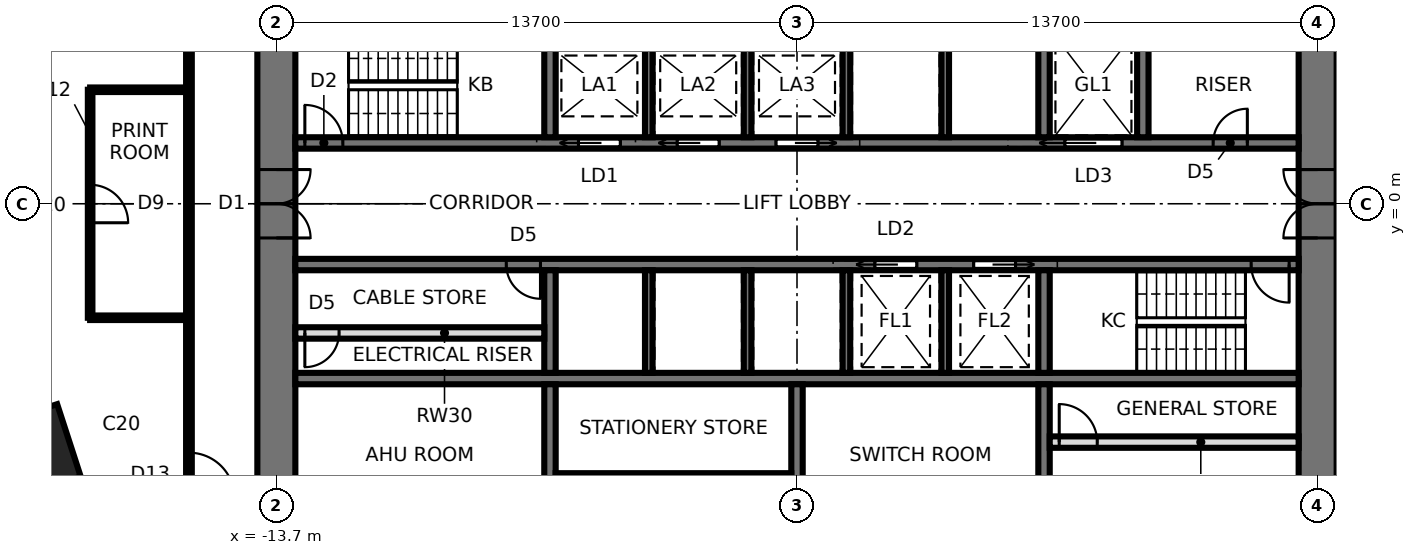
"""IFC4 building model, lengths in metres.
Left out: names, types, materials, properties, quantities, classifications, styles, units other than length and angle.
Written with IfcOpenShell. Run it as: python <this file> out.ifc"""

import sys

from ifc_helpers import new_model, si_unit, direction, frame, frame_2d, origin, origin_2d, place, context, subcontext, project, spatial, rectangle, extrude, element, fill, save


model = new_model("IFC4")
c1 = context("Model", 3, precision=1e-05, world=origin(), true_north=direction((0.0, 1.0)))
c2 = subcontext(c1, "Body", "Model", "MODEL_VIEW")
j1 = project(units=[si_unit("LENGTHUNIT", "METRE"), si_unit("PLANEANGLEUNIT", "RADIAN")], contexts=[c1])
p1 = place(None, origin())
s1 = spatial("IfcSite", under=j1, at=p1, CompositionType="ELEMENT")
p2 = place(p1, origin())
s2 = spatial("IfcBuilding", under=s1, at=p2, CompositionType="ELEMENT")
p3 = place(p2, frame((0.0, 0.0, 82.6)))
s3 = spatial("IfcBuildingStorey", under=s2, at=p3, CompositionType="ELEMENT", Elevation=82.6)
p4 = place(p3, frame((-20.109, -6.534, 0.0), z_axis=(0.0, 0.0, 1.0), x_axis=(-0.951056516295, -0.309016994375, 0.0)))
e1 = element("IfcColumn", 1, at=p4, inside=s3, PredefinedType="COLUMN", context=c2, shape_type="SweptSolid", body=[
    extrude(rectangle(XDim=2.0, YDim=2.0, at=origin_2d()), origin(), (0.0, 0.0, 1.0), 4.2),
])
p5 = place(p3, frame((13.7, -9.5, 0.0), z_axis=(0.0, 0.0, 1.0), x_axis=(0.0, 1.0, 0.0)))
e2 = element("IfcWall", 2, at=p5, inside=s3, PredefinedType="SHEAR", context=c2, shape_type="SweptSolid", body=[
    extrude(rectangle(XDim=19.0, YDim=1.0, at=frame_2d((9.5, 0.0))), origin(), (0.0, 0.0, 1.0), 4.2),
])
p6 = place(p5, frame((8.6, 0.0, 0.0)))
e3 = element("IfcOpeningElement", 3, at=p6, cuts=e2, PredefinedType="OPENING", context=c2, shape_type="SweptSolid", body=[
    extrude(rectangle(XDim=1.8, YDim=2.4, at=frame_2d((0.9, 1.2))), frame((0.0, 0.51, 0.0), z_axis=(0.0, -1.0, 0.0), x_axis=(1.0, 0.0, 0.0)), (0.0, 0.0, 1.0), 1.02),
])
p7 = place(p3, frame((-13.7, 9.5, 0.0), z_axis=(0.0, 0.0, 1.0), x_axis=(0.0, -1.0, 0.0)))
e4 = element("IfcWall", 4, at=p7, inside=s3, PredefinedType="SHEAR", context=c2, shape_type="SweptSolid", body=[
    extrude(rectangle(XDim=19.0, YDim=1.0, at=frame_2d((9.5, 0.0))), origin(), (0.0, 0.0, 1.0), 4.2),
])
p8 = place(p7, frame((8.6, 0.0, 0.0)))
e5 = element("IfcOpeningElement", 5, at=p8, cuts=e4, PredefinedType="OPENING", context=c2, shape_type="SweptSolid", body=[
    extrude(rectangle(XDim=1.8, YDim=2.4, at=frame_2d((0.9, 1.2))), frame((0.0, 0.51, 0.0), z_axis=(0.0, -1.0, 0.0), x_axis=(1.0, 0.0, 0.0)), (0.0, 0.0, 1.0), 1.02),
])
p9 = place(p3, frame((-13.2, 1.6, 0.0), z_axis=(0.0, 0.0, 1.0), x_axis=(1.0, 0.0, 0.0)))
e6 = element("IfcWall", 6, at=p9, inside=s3, PredefinedType="SHEAR", context=c2, shape_type="SweptSolid", body=[
    extrude(rectangle(XDim=26.4, YDim=0.3, at=frame_2d((13.2, 0.0))), origin(), (0.0, 0.0, 1.0), 4.2),
])
p10 = place(p9, frame((0.25, 0.0, 0.0)))
e7 = element("IfcOpeningElement", 7, at=p10, cuts=e6, PredefinedType="OPENING", context=c2, shape_type="SweptSolid", body=[
    extrude(rectangle(XDim=1.0, YDim=2.1, at=frame_2d((0.5, 1.05))), frame((0.0, 0.16, 0.0), z_axis=(0.0, -1.0, 0.0), x_axis=(1.0, 0.0, 0.0)), (0.0, 0.0, 1.0), 0.32),
])
p11 = place(p9, frame((20.25, 0.0, 0.0)))
e8 = element("IfcOpeningElement", 8, at=p11, cuts=e6, PredefinedType="OPENING", context=c2, shape_type="SweptSolid", body=[
    extrude(rectangle(XDim=1.5, YDim=2.4, at=frame_2d((0.75, 1.2))), frame((0.0, 0.16, 0.0), z_axis=(0.0, -1.0, 0.0), x_axis=(1.0, 0.0, 0.0)), (0.0, 0.0, 1.0), 0.32),
])
p12 = place(p9, frame((7.45, 0.0, 0.0)))
e9 = element("IfcOpeningElement", 9, at=p12, cuts=e6, PredefinedType="OPENING", context=c2, shape_type="SweptSolid", body=[
    extrude(rectangle(XDim=1.1, YDim=2.3, at=frame_2d((0.55, 1.15))), frame((0.0, 0.16, 0.0), z_axis=(0.0, -1.0, 0.0), x_axis=(1.0, 0.0, 0.0)), (0.0, 0.0, 1.0), 0.32),
])
p13 = place(p9, frame((10.05, 0.0, 0.0)))
e10 = element("IfcOpeningElement", 10, at=p13, cuts=e6, PredefinedType="OPENING", context=c2, shape_type="SweptSolid", body=[
    extrude(rectangle(XDim=1.1, YDim=2.3, at=frame_2d((0.55, 1.15))), frame((0.0, 0.16, 0.0), z_axis=(0.0, -1.0, 0.0), x_axis=(1.0, 0.0, 0.0)), (0.0, 0.0, 1.0), 0.32),
])
p14 = place(p9, frame((12.65, 0.0, 0.0)))
e11 = element("IfcOpeningElement", 11, at=p14, cuts=e6, PredefinedType="OPENING", context=c2, shape_type="SweptSolid", body=[
    extrude(rectangle(XDim=1.1, YDim=2.3, at=frame_2d((0.55, 1.15))), frame((0.0, 0.16, 0.0), z_axis=(0.0, -1.0, 0.0), x_axis=(1.0, 0.0, 0.0)), (0.0, 0.0, 1.0), 0.32),
])
p15 = place(p9, frame((24.15, 0.0, 0.0)))
e12 = element("IfcOpeningElement", 12, at=p15, cuts=e6, PredefinedType="OPENING", context=c2, shape_type="SweptSolid", body=[
    extrude(rectangle(XDim=0.9, YDim=2.1, at=frame_2d((0.45, 1.05))), frame((0.0, 0.16, 0.0), z_axis=(0.0, -1.0, 0.0), x_axis=(1.0, 0.0, 0.0)), (0.0, 0.0, 1.0), 0.32),
])
p16 = place(p3, frame((-13.2, -1.6, 0.0), z_axis=(0.0, 0.0, 1.0), x_axis=(1.0, 0.0, 0.0)))
e13 = element("IfcWall", 13, at=p16, inside=s3, PredefinedType="SHEAR", context=c2, shape_type="SweptSolid", body=[
    extrude(rectangle(XDim=26.4, YDim=0.3, at=frame_2d((13.2, 0.0))), origin(), (0.0, 0.0, 1.0), 4.2),
])
p17 = place(p16, frame((25.15, 0.0, 0.0)))
e14 = element("IfcOpeningElement", 14, at=p17, cuts=e13, PredefinedType="OPENING", context=c2, shape_type="SweptSolid", body=[
    extrude(rectangle(XDim=1.0, YDim=2.1, at=frame_2d((0.5, 1.05))), frame((0.0, 0.16, 0.0), z_axis=(0.0, -1.0, 0.0), x_axis=(1.0, 0.0, 0.0)), (0.0, 0.0, 1.0), 0.32),
])
p18 = place(p16, frame((15.25, 0.0, 0.0)))
e15 = element("IfcOpeningElement", 15, at=p18, cuts=e13, PredefinedType="OPENING", context=c2, shape_type="SweptSolid", body=[
    extrude(rectangle(XDim=1.1, YDim=2.3, at=frame_2d((0.55, 1.15))), frame((0.0, 0.16, 0.0), z_axis=(0.0, -1.0, 0.0), x_axis=(1.0, 0.0, 0.0)), (0.0, 0.0, 1.0), 0.32),
])
p19 = place(p16, frame((17.85, 0.0, 0.0)))
e16 = element("IfcOpeningElement", 16, at=p19, cuts=e13, PredefinedType="OPENING", context=c2, shape_type="SweptSolid", body=[
    extrude(rectangle(XDim=1.1, YDim=2.3, at=frame_2d((0.55, 1.15))), frame((0.0, 0.16, 0.0), z_axis=(0.0, -1.0, 0.0), x_axis=(1.0, 0.0, 0.0)), (0.0, 0.0, 1.0), 0.32),
])
p20 = place(p16, frame((5.55, 0.0, 0.0)))
e17 = element("IfcOpeningElement", 17, at=p20, cuts=e13, PredefinedType="OPENING", context=c2, shape_type="SweptSolid", body=[
    extrude(rectangle(XDim=0.9, YDim=2.1, at=frame_2d((0.45, 1.05))), frame((0.0, 0.16, 0.0), z_axis=(0.0, -1.0, 0.0), x_axis=(1.0, 0.0, 0.0)), (0.0, 0.0, 1.0), 0.32),
])
p21 = place(p3, frame((-13.2, -4.6, 0.0), z_axis=(0.0, 0.0, 1.0), x_axis=(1.0, 0.0, 0.0)))
e18 = element("IfcWall", 18, at=p21, inside=s3, PredefinedType="SHEAR", context=c2, shape_type="SweptSolid", body=[
    extrude(rectangle(XDim=26.4, YDim=0.3, at=frame_2d((13.2, 0.0))), origin(), (0.0, 0.0, 1.0), 4.2),
])
for number, where, z_axis, x_axis in (
    (19, (-6.5, 1.75, 0.0), (0.0, 0.0, 1.0), (0.0, 1.0, 0.0)),
    (20, (6.5, 1.75, 0.0), (0.0, 0.0, 1.0), (0.0, 1.0, 0.0)),
):
    element("IfcWall", number, at=place(p3, frame(where, z_axis=z_axis, x_axis=x_axis)), inside=s3, PredefinedType="SHEAR", context=c2, shape_type="SweptSolid", body=[
        extrude(rectangle(XDim=2.7, YDim=0.3, at=frame_2d((1.35, 0.0))), origin(), (0.0, 0.0, 1.0), 4.2),
    ])
for number, where, z_axis, x_axis in (
    (21, (-3.9, 1.75, 0.0), (0.0, 0.0, 1.0), (0.0, 1.0, 0.0)),
    (22, (-1.3, 1.75, 0.0), (0.0, 0.0, 1.0), (0.0, 1.0, 0.0)),
    (23, (1.3, 1.75, 0.0), (0.0, 0.0, 1.0), (0.0, 1.0, 0.0)),
    (24, (3.9, 1.75, 0.0), (0.0, 0.0, 1.0), (0.0, 1.0, 0.0)),
):
    element("IfcWall", number, at=place(p3, frame(where, z_axis=z_axis, x_axis=x_axis)), inside=s3, PredefinedType="SHEAR", context=c2, shape_type="SweptSolid", body=[
        extrude(rectangle(XDim=2.7, YDim=0.2, at=frame_2d((1.35, 0.0))), origin(), (0.0, 0.0, 1.0), 4.2),
    ])
p22 = place(p3, frame((-6.5, -1.75, 0.0), z_axis=(0.0, 0.0, 1.0), x_axis=(0.0, -1.0, 0.0)))
e25 = element("IfcWall", 25, at=p22, inside=s3, PredefinedType="SHEAR", context=c2, shape_type="SweptSolid", body=[
    extrude(rectangle(XDim=2.7, YDim=0.3, at=frame_2d((1.35, 0.0))), origin(), (0.0, 0.0, 1.0), 4.2),
])
p23 = place(p3, frame((-6.5, -4.75, 0.0), z_axis=(0.0, 0.0, 1.0), x_axis=(0.0, -1.0, 0.0)))
e26 = element("IfcWall", 26, at=p23, inside=s3, PredefinedType="SHEAR", context=c2, shape_type="SweptSolid", body=[
    extrude(rectangle(XDim=3.75, YDim=0.3, at=frame_2d((1.875, 0.0))), origin(), (0.0, 0.0, 1.0), 4.2),
])
p24 = place(p3, frame((6.5, -1.75, 0.0), z_axis=(0.0, 0.0, 1.0), x_axis=(0.0, -1.0, 0.0)))
e27 = element("IfcWall", 27, at=p24, inside=s3, PredefinedType="SHEAR", context=c2, shape_type="SweptSolid", body=[
    extrude(rectangle(XDim=2.7, YDim=0.3, at=frame_2d((1.35, 0.0))), origin(), (0.0, 0.0, 1.0), 4.2),
])
p25 = place(p3, frame((6.5, -4.75, 0.0), z_axis=(0.0, 0.0, 1.0), x_axis=(0.0, -1.0, 0.0)))
e28 = element("IfcWall", 28, at=p25, inside=s3, PredefinedType="SHEAR", context=c2, shape_type="SweptSolid", body=[
    extrude(rectangle(XDim=3.75, YDim=0.3, at=frame_2d((1.875, 0.0))), origin(), (0.0, 0.0, 1.0), 4.2),
])
for number, where, z_axis, x_axis in (
    (29, (-3.9, -1.75, 0.0), (0.0, 0.0, 1.0), (0.0, -1.0, 0.0)),
    (30, (-1.3, -1.75, 0.0), (0.0, 0.0, 1.0), (0.0, -1.0, 0.0)),
    (31, (1.3, -1.75, 0.0), (0.0, 0.0, 1.0), (0.0, -1.0, 0.0)),
    (32, (3.9, -1.75, 0.0), (0.0, 0.0, 1.0), (0.0, -1.0, 0.0)),
):
    element("IfcWall", number, at=place(p3, frame(where, z_axis=z_axis, x_axis=x_axis)), inside=s3, PredefinedType="SHEAR", context=c2, shape_type="SweptSolid", body=[
        extrude(rectangle(XDim=2.7, YDim=0.2, at=frame_2d((1.35, 0.0))), origin(), (0.0, 0.0, 1.0), 4.2),
    ])
p26 = place(p3, frame((0.0, -4.75, 0.0), z_axis=(0.0, 0.0, 1.0), x_axis=(0.0, -1.0, 0.0)))
e33 = element("IfcWall", 33, at=p26, inside=s3, PredefinedType="SHEAR", context=c2, shape_type="SweptSolid", body=[
    extrude(rectangle(XDim=3.75, YDim=0.3, at=frame_2d((1.875, 0.0))), origin(), (0.0, 0.0, 1.0), 4.2),
])
p27 = place(p3, frame((9.1, 1.75, 0.0), z_axis=(0.0, 0.0, 1.0), x_axis=(0.0, 1.0, 0.0)))
e34 = element("IfcWall", 34, at=p27, inside=s3, PredefinedType="SHEAR", context=c2, shape_type="SweptSolid", body=[
    extrude(rectangle(XDim=2.7, YDim=0.3, at=frame_2d((1.35, 0.0))), origin(), (0.0, 0.0, 1.0), 4.2),
])
p28 = place(p3, frame((-6.35, -7.24, 0.0), z_axis=(0.0, 0.0, 1.0), x_axis=(1.0, 0.0, 0.0)))
e35 = element("IfcWall", 35, at=p28, inside=s3, PredefinedType="PARTITIONING", context=c2, shape_type="SweptSolid", body=[
    extrude(rectangle(XDim=6.2, YDim=0.3, at=frame_2d((3.1, 0.0))), origin(), (0.0, 0.0, 1.0), 4.0),
])
p29 = place(p28, frame((0.25, 0.0, 0.0)))
e36 = element("IfcOpeningElement", 36, at=p29, cuts=e35, PredefinedType="OPENING", context=c2, shape_type="SweptSolid", body=[
    extrude(rectangle(XDim=1.0, YDim=2.4, at=frame_2d((0.5, 1.2))), frame((0.0, 0.16, 0.0), z_axis=(0.0, -1.0, 0.0), x_axis=(1.0, 0.0, 0.0)), (0.0, 0.0, 1.0), 0.32),
])
p30 = place(p3, frame((6.65, -6.272, 0.0), z_axis=(0.0, 0.0, 1.0), x_axis=(1.0, 0.0, 0.0)))
e37 = element("IfcWall", 37, at=p30, inside=s3, PredefinedType="PARTITIONING", context=c2, shape_type="SweptSolid", body=[
    extrude(rectangle(XDim=6.55, YDim=0.3, at=frame_2d((3.275, 0.0))), origin(), (0.0, 0.0, 1.0), 4.0),
])
p31 = place(p30, frame((0.25, 0.0, 0.0)))
e38 = element("IfcOpeningElement", 38, at=p31, cuts=e37, PredefinedType="OPENING", context=c2, shape_type="SweptSolid", body=[
    extrude(rectangle(XDim=1.0, YDim=2.4, at=frame_2d((0.5, 1.2))), frame((0.0, 0.16, 0.0), z_axis=(0.0, -1.0, 0.0), x_axis=(1.0, 0.0, 0.0)), (0.0, 0.0, 1.0), 0.32),
])
p32 = place(p3, frame((-13.2, -3.4, 0.0), z_axis=(0.0, 0.0, 1.0), x_axis=(1.0, 0.0, 0.0)))
e39 = element("IfcWall", 39, at=p32, inside=s3, PredefinedType="SOLIDWALL", context=c2, shape_type="SweptSolid", body=[
    extrude(rectangle(XDim=6.55, YDim=0.3, at=frame_2d((3.275, 0.0))), origin(), (0.0, 0.0, 1.0), 4.0),
])
p33 = place(p32, frame((0.25, 0.0, 0.0)))
e40 = element("IfcOpeningElement", 40, at=p33, cuts=e39, PredefinedType="OPENING", context=c2, shape_type="SweptSolid", body=[
    extrude(rectangle(XDim=0.9, YDim=2.1, at=frame_2d((0.45, 1.05))), frame((0.0, 0.16, 0.0), z_axis=(0.0, -1.0, 0.0), x_axis=(1.0, 0.0, 0.0)), (0.0, 0.0, 1.0), 0.32),
])
for number, where, z_axis, x_axis in (
    (41, (-18.6, -3.0, 0.0), (0.0, 0.0, 1.0), (1.0, 0.0, 0.0)),
    (42, (-16.0, 3.0, 0.0), (0.0, 0.0, 1.0), (-1.0, 0.0, 0.0)),
):
    element("IfcWall", number, at=place(p3, frame(where, z_axis=z_axis, x_axis=x_axis)), inside=s3, PredefinedType="PARTITIONING", context=c2, shape_type="SweptSolid", body=[
        extrude(rectangle(XDim=2.6, YDim=0.12, at=frame_2d((1.3, 0.0))), origin(), (0.0, 0.0, 1.0), 4.0),
    ])
p34 = place(p3, frame((-18.6, 3.0, 0.0), z_axis=(0.0, 0.0, 1.0), x_axis=(0.0, -1.0, 0.0)))
e43 = element("IfcWall", 43, at=p34, inside=s3, PredefinedType="PARTITIONING", context=c2, shape_type="SweptSolid", body=[
    extrude(rectangle(XDim=6.0, YDim=0.12, at=frame_2d((3.0, 0.0))), origin(), (0.0, 0.0, 1.0), 4.0),
])
p35 = place(p34, frame((2.5, 0.0, 0.0)))
e44 = element("IfcOpeningElement", 44, at=p35, cuts=e43, PredefinedType="OPENING", context=c2, shape_type="SweptSolid", body=[
    extrude(rectangle(XDim=1.0, YDim=2.4, at=frame_2d((0.5, 1.2))), frame((0.0, 0.07, 0.0), z_axis=(0.0, -1.0, 0.0), x_axis=(1.0, 0.0, 0.0)), (0.0, 0.0, 1.0), 0.14),
])
p36 = place(p3, frame((-16.0, 11.3, 0.0), z_axis=(0.0, 0.0, 1.0), x_axis=(0.0, -1.0, 0.0)))
e45 = element("IfcWall", 45, at=p36, inside=s3, PredefinedType="PARTITIONING", context=c2, shape_type="SweptSolid", body=[
    extrude(rectangle(XDim=22.6, YDim=0.15, at=frame_2d((11.3, 0.0))), origin(), (0.0, 0.0, 1.0), 4.0),
])
p37 = place(p36, frame((17.85, 0.0, 0.0)))
e46 = element("IfcOpeningElement", 46, at=p37, cuts=e45, PredefinedType="OPENING", context=c2, shape_type="SweptSolid", body=[
    extrude(rectangle(XDim=1.2, YDim=2.4, at=frame_2d((0.6, 1.2))), frame((0.0, 0.085, 0.0), z_axis=(0.0, -1.0, 0.0), x_axis=(1.0, 0.0, 0.0)), (0.0, 0.0, 1.0), 0.17),
])
p38 = place(p8, origin())
e47 = element("IfcDoor", 47, at=p38, inside=s3, OperationType="DOUBLE_DOOR_SINGLE_SWING", PredefinedType="DOOR", context=c2, shape_type="SweptSolid", body=[
    extrude(rectangle(XDim=1.72, YDim=2.36, at=frame_2d((0.9, 1.18))), frame((0.0, 0.025, 0.0), z_axis=(0.0, -1.0, 0.0), x_axis=(1.0, 0.0, 0.0)), (0.0, 0.0, 1.0), 0.05),
    extrude(rectangle(XDim=0.04, YDim=2.4, at=frame_2d((0.02, 1.2))), frame((0.0, 0.25, 0.0), z_axis=(0.0, -1.0, 0.0), x_axis=(1.0, 0.0, 0.0)), (0.0, 0.0, 1.0), 0.5),
    extrude(rectangle(XDim=0.04, YDim=2.4, at=frame_2d((1.78, 1.2))), frame((0.0, 0.25, 0.0), z_axis=(0.0, -1.0, 0.0), x_axis=(1.0, 0.0, 0.0)), (0.0, 0.0, 1.0), 0.5),
    extrude(rectangle(XDim=1.72, YDim=0.04, at=frame_2d((0.9, 2.38))), frame((0.0, 0.25, 0.0), z_axis=(0.0, -1.0, 0.0), x_axis=(1.0, 0.0, 0.0)), (0.0, 0.0, 1.0), 0.5),
])
fill(e5, e47)
p39 = place(p6, origin())
e48 = element("IfcDoor", 48, at=p39, inside=s3, OperationType="DOUBLE_DOOR_SINGLE_SWING", PredefinedType="DOOR", context=c2, shape_type="SweptSolid", body=[
    extrude(rectangle(XDim=1.72, YDim=2.36, at=frame_2d((0.9, 1.18))), frame((0.0, 0.025, 0.0), z_axis=(0.0, -1.0, 0.0), x_axis=(1.0, 0.0, 0.0)), (0.0, 0.0, 1.0), 0.05),
    extrude(rectangle(XDim=0.04, YDim=2.4, at=frame_2d((0.02, 1.2))), frame((0.0, 0.25, 0.0), z_axis=(0.0, -1.0, 0.0), x_axis=(1.0, 0.0, 0.0)), (0.0, 0.0, 1.0), 0.5),
    extrude(rectangle(XDim=0.04, YDim=2.4, at=frame_2d((1.78, 1.2))), frame((0.0, 0.25, 0.0), z_axis=(0.0, -1.0, 0.0), x_axis=(1.0, 0.0, 0.0)), (0.0, 0.0, 1.0), 0.5),
    extrude(rectangle(XDim=1.72, YDim=0.04, at=frame_2d((0.9, 2.38))), frame((0.0, 0.25, 0.0), z_axis=(0.0, -1.0, 0.0), x_axis=(1.0, 0.0, 0.0)), (0.0, 0.0, 1.0), 0.5),
])
fill(e3, e48)
p40 = place(p10, origin())
e49 = element("IfcDoor", 49, at=p40, inside=s3, OperationType="SINGLE_SWING_LEFT", PredefinedType="DOOR", context=c2, shape_type="SweptSolid", body=[
    extrude(rectangle(XDim=1.0, YDim=2.1, at=frame_2d((0.5, 1.05))), frame((0.0, 0.025, 0.0), z_axis=(0.0, -1.0, 0.0), x_axis=(1.0, 0.0, 0.0)), (0.0, 0.0, 1.0), 0.05),
])
fill(e7, e49)
p41 = place(p17, frame((1.0, 0.0, 0.0), z_axis=(0.0, 0.0, 1.0), x_axis=(-1.0, 0.0, 0.0)))
e50 = element("IfcDoor", 50, at=p41, inside=s3, OperationType="SINGLE_SWING_LEFT", PredefinedType="DOOR", context=c2, shape_type="SweptSolid", body=[
    extrude(rectangle(XDim=1.0, YDim=2.1, at=frame_2d((0.5, 1.05))), frame((0.0, 0.025, 0.0), z_axis=(0.0, -1.0, 0.0), x_axis=(1.0, 0.0, 0.0)), (0.0, 0.0, 1.0), 0.05),
])
fill(e14, e50)
p42 = place(p11, origin())
e51 = element("IfcDoor", 51, at=p42, inside=s3, OperationType="SLIDING_TO_LEFT", PredefinedType="DOOR", context=c2, shape_type="SweptSolid", body=[
    extrude(rectangle(XDim=1.5, YDim=2.4, at=frame_2d((0.75, 1.2))), frame((0.0, 0.025, 0.0), z_axis=(0.0, -1.0, 0.0), x_axis=(1.0, 0.0, 0.0)), (0.0, 0.0, 1.0), 0.05),
])
fill(e8, e51)
p43 = place(p12, origin())
e52 = element("IfcDoor", 52, at=p43, inside=s3, OperationType="SLIDING_TO_LEFT", PredefinedType="DOOR", context=c2, shape_type="SweptSolid", body=[
    extrude(rectangle(XDim=1.1, YDim=2.3, at=frame_2d((0.55, 1.15))), frame((0.0, 0.025, 0.0), z_axis=(0.0, -1.0, 0.0), x_axis=(1.0, 0.0, 0.0)), (0.0, 0.0, 1.0), 0.05),
])
fill(e9, e52)
p44 = place(p13, origin())
e53 = element("IfcDoor", 53, at=p44, inside=s3, OperationType="SLIDING_TO_LEFT", PredefinedType="DOOR", context=c2, shape_type="SweptSolid", body=[
    extrude(rectangle(XDim=1.1, YDim=2.3, at=frame_2d((0.55, 1.15))), frame((0.0, 0.025, 0.0), z_axis=(0.0, -1.0, 0.0), x_axis=(1.0, 0.0, 0.0)), (0.0, 0.0, 1.0), 0.05),
])
fill(e10, e53)
p45 = place(p14, origin())
e54 = element("IfcDoor", 54, at=p45, inside=s3, OperationType="SLIDING_TO_RIGHT", PredefinedType="DOOR", context=c2, shape_type="SweptSolid", body=[
    extrude(rectangle(XDim=1.1, YDim=2.3, at=frame_2d((0.55, 1.15))), frame((0.0, 0.025, 0.0), z_axis=(0.0, -1.0, 0.0), x_axis=(1.0, 0.0, 0.0)), (0.0, 0.0, 1.0), 0.05),
])
fill(e11, e54)
p46 = place(p18, frame((1.1, 0.0, 0.0), z_axis=(0.0, 0.0, 1.0), x_axis=(-1.0, 0.0, 0.0)))
e55 = element("IfcDoor", 55, at=p46, inside=s3, OperationType="SLIDING_TO_RIGHT", PredefinedType="DOOR", context=c2, shape_type="SweptSolid", body=[
    extrude(rectangle(XDim=1.1, YDim=2.3, at=frame_2d((0.55, 1.15))), frame((0.0, 0.025, 0.0), z_axis=(0.0, -1.0, 0.0), x_axis=(1.0, 0.0, 0.0)), (0.0, 0.0, 1.0), 0.05),
])
fill(e15, e55)
p47 = place(p19, frame((1.1, 0.0, 0.0), z_axis=(0.0, 0.0, 1.0), x_axis=(-1.0, 0.0, 0.0)))
e56 = element("IfcDoor", 56, at=p47, inside=s3, OperationType="SLIDING_TO_LEFT", PredefinedType="DOOR", context=c2, shape_type="SweptSolid", body=[
    extrude(rectangle(XDim=1.1, YDim=2.3, at=frame_2d((0.55, 1.15))), frame((0.0, 0.025, 0.0), z_axis=(0.0, -1.0, 0.0), x_axis=(1.0, 0.0, 0.0)), (0.0, 0.0, 1.0), 0.05),
])
fill(e16, e56)
p48 = place(p15, origin())
e57 = element("IfcDoor", 57, at=p48, inside=s3, OperationType="SINGLE_SWING_RIGHT", PredefinedType="DOOR", context=c2, shape_type="SweptSolid", body=[
    extrude(rectangle(XDim=0.9, YDim=2.1, at=frame_2d((0.45, 1.05))), frame((0.0, 0.025, 0.0), z_axis=(0.0, -1.0, 0.0), x_axis=(1.0, 0.0, 0.0)), (0.0, 0.0, 1.0), 0.05),
])
fill(e12, e57)
p49 = place(p20, frame((0.9, 0.0, 0.0), z_axis=(0.0, 0.0, 1.0), x_axis=(-1.0, 0.0, 0.0)))
e58 = element("IfcDoor", 58, at=p49, inside=s3, OperationType="SINGLE_SWING_LEFT", PredefinedType="DOOR", context=c2, shape_type="SweptSolid", body=[
    extrude(rectangle(XDim=0.9, YDim=2.1, at=frame_2d((0.45, 1.05))), frame((0.0, 0.025, 0.0), z_axis=(0.0, -1.0, 0.0), x_axis=(1.0, 0.0, 0.0)), (0.0, 0.0, 1.0), 0.05),
])
fill(e17, e58)
p50 = place(p31, origin())
e59 = element("IfcDoor", 59, at=p50, inside=s3, OperationType="SINGLE_SWING_LEFT", PredefinedType="DOOR", context=c2, shape_type="SweptSolid", body=[
    extrude(rectangle(XDim=1.0, YDim=2.4, at=frame_2d((0.5, 1.2))), frame((0.0, 0.025, 0.0), z_axis=(0.0, -1.0, 0.0), x_axis=(1.0, 0.0, 0.0)), (0.0, 0.0, 1.0), 0.05),
])
fill(e38, e59)
p51 = place(p33, frame((0.9, 0.0, 0.0), z_axis=(0.0, 0.0, 1.0), x_axis=(-1.0, 0.0, 0.0)))
e60 = element("IfcDoor", 60, at=p51, inside=s3, OperationType="SINGLE_SWING_RIGHT", PredefinedType="DOOR", context=c2, shape_type="SweptSolid", body=[
    extrude(rectangle(XDim=0.9, YDim=2.1, at=frame_2d((0.45, 1.05))), frame((0.0, 0.025, 0.0), z_axis=(0.0, -1.0, 0.0), x_axis=(1.0, 0.0, 0.0)), (0.0, 0.0, 1.0), 0.05),
])
fill(e40, e60)
p52 = place(p35, origin())
e61 = element("IfcDoor", 61, at=p52, inside=s3, OperationType="SINGLE_SWING_RIGHT", PredefinedType="DOOR", context=c2, shape_type="SweptSolid", body=[
    extrude(rectangle(XDim=1.0, YDim=2.4, at=frame_2d((0.5, 1.2))), frame((0.0, 0.025, 0.0), z_axis=(0.0, -1.0, 0.0), x_axis=(1.0, 0.0, 0.0)), (0.0, 0.0, 1.0), 0.05),
])
fill(e44, e61)
p53 = place(p37, origin())
e62 = element("IfcDoor", 62, at=p53, inside=s3, OperationType="SINGLE_SWING_RIGHT", PredefinedType="DOOR", context=c2, shape_type="SweptSolid", body=[
    extrude(rectangle(XDim=1.2, YDim=2.4, at=frame_2d((0.6, 1.2))), frame((0.0, 0.025, 0.0), z_axis=(0.0, -1.0, 0.0), x_axis=(1.0, 0.0, 0.0)), (0.0, 0.0, 1.0), 0.05),
])
fill(e46, e62)
save(model, sys.argv[1])
